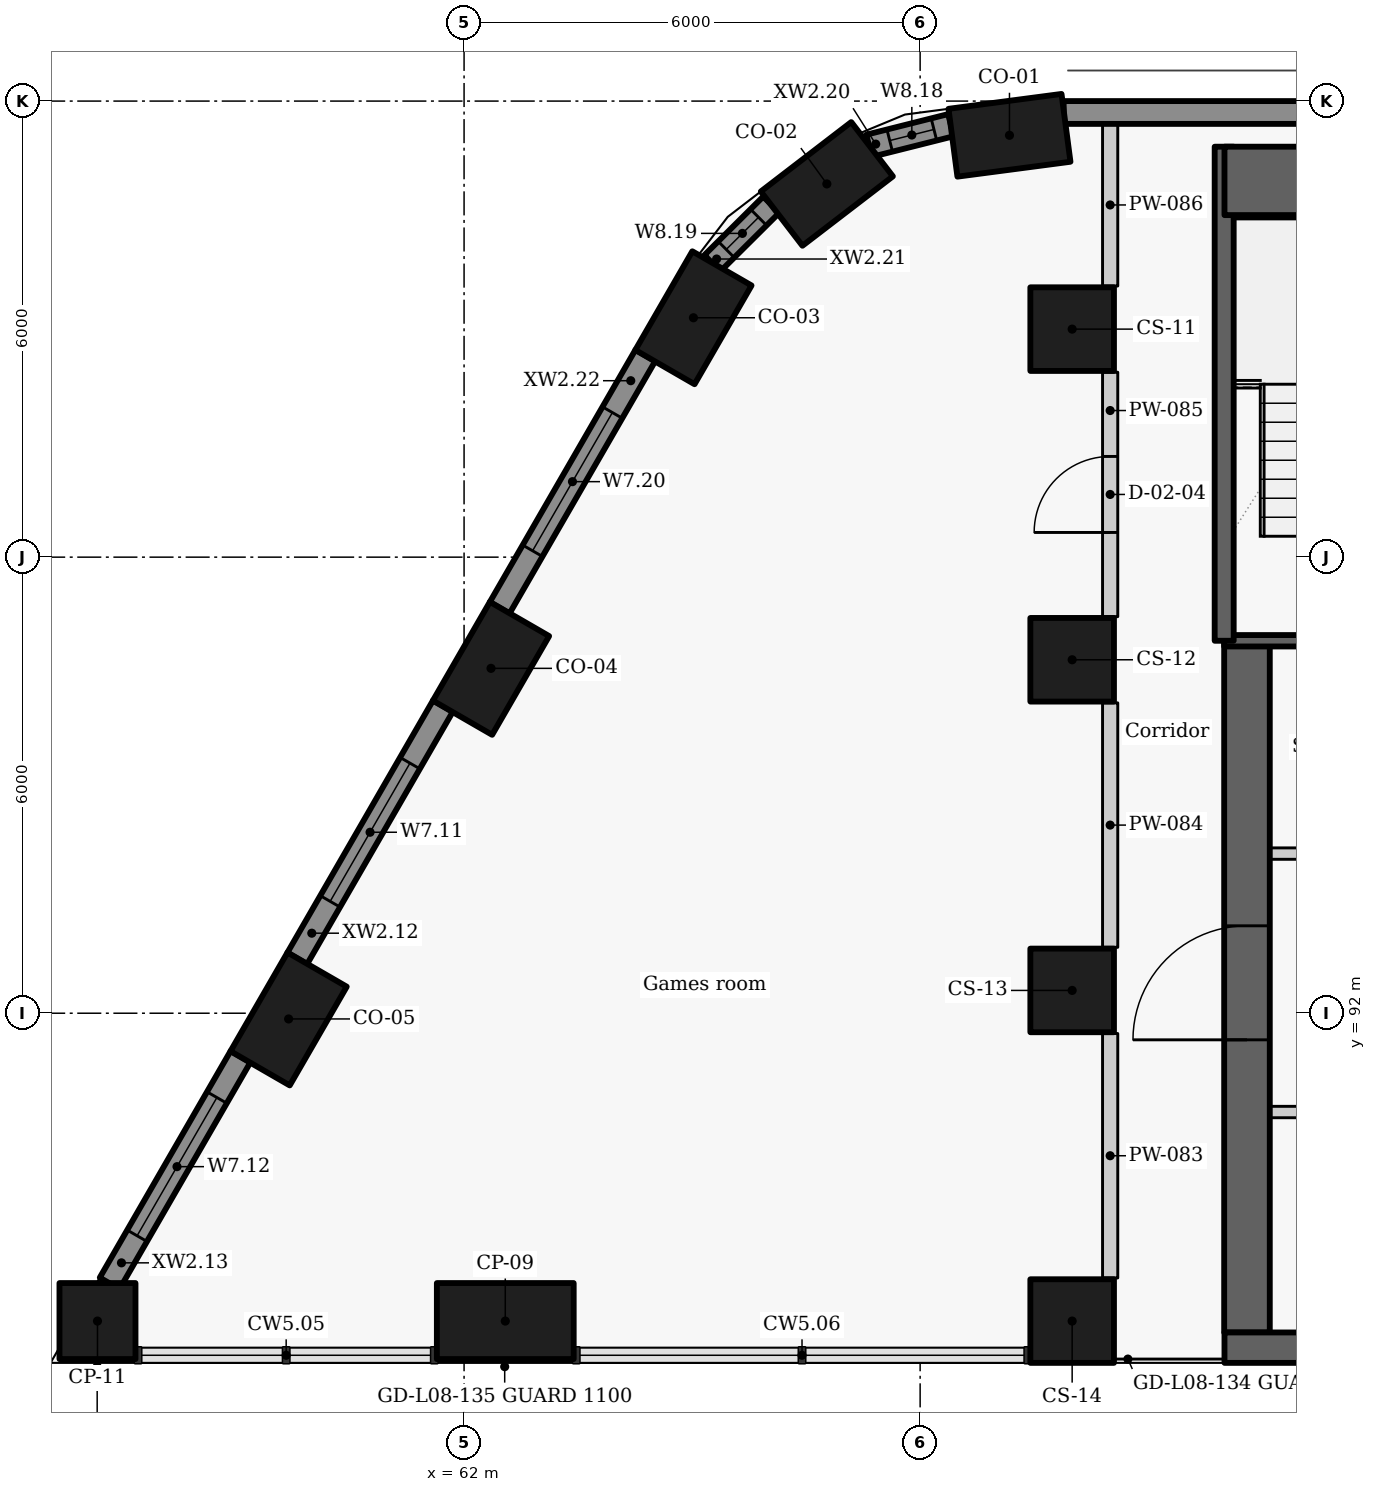
"""IFC4 building model, lengths in metres.
Left out: names, types, materials, properties, quantities, classifications, styles, units other than length and angle.
Written with IfcOpenShell. Run it as: python <this file> out.ifc"""

import sys

from ifc_helpers import new_model, si_unit, direction, frame, frame_2d, origin, origin_2d, place, context, subcontext, project, spatial, rectangle, extrude, element, fill, save


model = new_model("IFC4")
c1 = context("Model", 3, precision=1e-05, world=origin(), true_north=direction((0.0, 1.0)))
c2 = subcontext(c1, "Body", "Model", "MODEL_VIEW")
j1 = project(units=[si_unit("LENGTHUNIT", "METRE"), si_unit("PLANEANGLEUNIT", "RADIAN")], contexts=[c1])
p1 = place(None, origin())
s1 = spatial("IfcSite", under=j1, at=p1, CompositionType="ELEMENT")
p2 = place(p1, origin())
s2 = spatial("IfcBuilding", under=s1, at=p2, CompositionType="ELEMENT")
p3 = place(p2, frame((0.0, 0.0, 34.8)))
s3 = spatial("IfcBuildingStorey", under=s2, at=p3, CompositionType="ELEMENT", Elevation=34.8)
for number, where, z_axis, x_axis in (
    (1, (69.175, 103.55, 0.0), (0.0, 0.0, 1.0), (-0.991, -0.131, 0.0)),
    (2, (66.773, 102.91, 0.0), (0.0, 0.0, 1.0), (-0.793, -0.609, 0.0)),
    (3, (65.018, 101.149, 0.0), (0.0, 0.0, 1.0), (-0.5, -0.866, 0.0)),
    (4, (62.354, 96.537, 0.0), (0.0, 0.0, 1.0), (-0.5, -0.866, 0.0)),
    (5, (59.692, 91.925, 0.0), (0.0, 0.0, 1.0), (-0.5, -0.866, 0.0)),
):
    element("IfcColumn", number, at=place(p3, frame(where, z_axis=z_axis, x_axis=x_axis)), inside=s3, PredefinedType="COLUMN", context=c2, shape_type="SweptSolid", body=[
        extrude(rectangle(XDim=1.5, YDim=0.9, at=origin_2d()), origin(), (0.0, 0.0, 1.0), 3.3),
    ])
for number, where, z_axis, x_axis in (
    (6, (70.0, 101.0, 0.0), (0.0, 0.0, 1.0), (0.0, -1.0, 0.0)),
    (7, (70.0, 96.65, 0.0), (0.0, 0.0, 1.0), (0.0, -1.0, 0.0)),
    (8, (70.0, 92.3, 0.0), (0.0, 0.0, 1.0), (0.0, -1.0, 0.0)),
    (9, (70.0, 87.95, 0.0), (0.0, 0.0, 1.0), (0.0, -1.0, 0.0)),
):
    element("IfcColumn", number, at=place(p3, frame(where, z_axis=z_axis, x_axis=x_axis)), inside=s3, PredefinedType="COLUMN", context=c2, shape_type="SweptSolid", body=[
        extrude(rectangle(XDim=1.1, YDim=1.1, at=origin_2d()), origin(), (0.0, 0.0, 1.0), 3.3),
    ])
p4 = place(p3, frame((62.542, 87.95, 0.0), z_axis=(0.0, 0.0, 1.0), x_axis=(1.0, 0.0, 0.0)))
e10 = element("IfcColumn", 10, at=p4, inside=s3, PredefinedType="COLUMN", context=c2, shape_type="SweptSolid", body=[
    extrude(rectangle(XDim=1.8, YDim=1.0, at=origin_2d()), origin(), (0.0, 0.0, 1.0), 3.3),
])
p5 = place(p3, frame((57.177, 87.95, 0.0), z_axis=(0.0, 0.0, 1.0), x_axis=(1.0, 0.0, 0.0)))
e11 = element("IfcColumn", 11, at=p5, inside=s3, PredefinedType="COLUMN", context=c2, shape_type="SweptSolid", body=[
    extrude(rectangle(XDim=1.0, YDim=1.0, at=origin_2d()), origin(), (0.0, 0.0, 1.0), 3.3),
])
p6 = place(p3, frame((61.722, 96.041, 0.0), z_axis=(0.0, 0.0, 1.0), x_axis=(-0.500001735503, -0.866024401789, 0.0)))
e12 = element("IfcWall", 12, at=p6, inside=s3, PredefinedType="SOLIDWALL", context=c2, shape_type="SweptSolid", body=[
    extrude(rectangle(XDim=3.834, YDim=0.3, at=frame_2d((1.917, 0.0))), origin(), (0.0, 0.0, 1.0), 2.3),
])
p7 = place(p6, frame((0.867, 0.0, 0.9)))
e13 = element("IfcOpeningElement", 13, at=p7, cuts=e12, PredefinedType="OPENING", context=c2, shape_type="SweptSolid", body=[
    extrude(rectangle(XDim=2.1, YDim=1.1, at=frame_2d((1.05, 0.55))), frame((0.0, 0.16, 0.0), z_axis=(0.0, -1.0, 0.0), x_axis=(1.0, 0.0, 0.0)), (0.0, 0.0, 1.0), 0.32),
])
p8 = place(p3, frame((59.059, 91.429, 0.0), z_axis=(0.0, 0.0, 1.0), x_axis=(-0.500035437112, -0.866004943191, 0.0)))
e14 = element("IfcWall", 14, at=p8, inside=s3, PredefinedType="SOLIDWALL", context=c2, shape_type="SweptSolid", body=[
    extrude(rectangle(XDim=3.444, YDim=0.3, at=frame_2d((1.722, 0.0))), origin(), (0.0, 0.0, 1.0), 2.3),
])
p9 = place(p8, frame((0.621, 0.0, 0.9)))
e15 = element("IfcOpeningElement", 15, at=p9, cuts=e14, PredefinedType="OPENING", context=c2, shape_type="SweptSolid", body=[
    extrude(rectangle(XDim=2.1, YDim=1.1, at=frame_2d((1.05, 0.55))), frame((0.0, 0.16, 0.0), z_axis=(0.0, -1.0, 0.0), x_axis=(1.0, 0.0, 0.0)), (0.0, 0.0, 1.0), 0.32),
])
p10 = place(p3, frame((90.079, 103.85, 0.0), z_axis=(0.0, 0.0, 1.0), x_axis=(-1.0, 0.0, 0.0)))
e16 = element("IfcWall", 16, at=p10, inside=s3, PredefinedType="SOLIDWALL", context=c2, shape_type="SweptSolid", body=[
    extrude(rectangle(XDim=20.19, YDim=0.3, at=frame_2d((10.095, 0.0))), origin(), (0.0, 0.0, 1.0), 2.3),
])
p11 = place(p3, frame((68.405, 103.683, 0.0), z_axis=(0.0, 0.0, 1.0), x_axis=(-0.969766298956, -0.244035500304, 0.0)))
e17 = element("IfcWall", 17, at=p11, inside=s3, PredefinedType="SOLIDWALL", context=c2, shape_type="SweptSolid", body=[
    extrude(rectangle(XDim=1.111, YDim=0.3, at=frame_2d((0.555, 0.0))), origin(), (0.0, 0.0, 1.0), 2.3),
])
p12 = place(p11, frame((0.231, 0.0, 0.9)))
e18 = element("IfcOpeningElement", 18, at=p12, cuts=e17, PredefinedType="OPENING", context=c2, shape_type="SweptSolid", body=[
    extrude(rectangle(XDim=0.6, YDim=1.1, at=frame_2d((0.3, 0.55))), frame((0.0, 0.16, 0.0), z_axis=(0.0, -1.0, 0.0), x_axis=(1.0, 0.0, 0.0)), (0.0, 0.0, 1.0), 0.32),
])
p13 = place(p3, frame((66.042, 102.637, 0.0), z_axis=(0.0, 0.0, 1.0), x_axis=(-0.708892395813, -0.705316646024, 0.0)))
e19 = element("IfcWall", 19, at=p13, inside=s3, PredefinedType="SOLIDWALL", context=c2, shape_type="SweptSolid", body=[
    extrude(rectangle(XDim=1.093, YDim=0.3, at=frame_2d((0.546, 0.0))), origin(), (0.0, 0.0, 1.0), 2.3),
])
p14 = place(p13, frame((0.236, 0.0, 0.9)))
e20 = element("IfcOpeningElement", 20, at=p14, cuts=e19, PredefinedType="OPENING", context=c2, shape_type="SweptSolid", body=[
    extrude(rectangle(XDim=0.6, YDim=1.1, at=frame_2d((0.3, 0.55))), frame((0.0, 0.16, 0.0), z_axis=(0.0, -1.0, 0.0), x_axis=(1.0, 0.0, 0.0)), (0.0, 0.0, 1.0), 0.32),
])
p15 = place(p3, frame((64.385, 100.654, 0.0), z_axis=(0.0, 0.0, 1.0), x_axis=(-0.499974163209, -0.866040320149, 0.0)))
e21 = element("IfcWall", 21, at=p15, inside=s3, PredefinedType="SOLIDWALL", context=c2, shape_type="SweptSolid", body=[
    extrude(rectangle(XDim=3.834, YDim=0.3, at=frame_2d((1.917, 0.0))), origin(), (0.0, 0.0, 1.0), 2.3),
])
p16 = place(p15, frame((0.867, 0.0, 0.9)))
e22 = element("IfcOpeningElement", 22, at=p16, cuts=e21, PredefinedType="OPENING", context=c2, shape_type="SweptSolid", body=[
    extrude(rectangle(XDim=2.1, YDim=1.1, at=frame_2d((1.05, 0.55))), frame((0.0, 0.16, 0.0), z_axis=(0.0, -1.0, 0.0), x_axis=(1.0, 0.0, 0.0)), (0.0, 0.0, 1.0), 0.32),
])
p17 = place(p3, frame((74.6, 90.7, 0.0), z_axis=(0.0, 0.0, 1.0), x_axis=(-1.0, 0.0, 0.0)))
e23 = element("IfcWall", 23, at=p17, inside=s3, PredefinedType="PARTITIONING", context=c2, shape_type="SweptSolid", body=[
    extrude(rectangle(XDim=2.6, YDim=0.15, at=frame_2d((1.3, 0.0))), origin(), (0.0, 0.0, 1.0), 2.9),
])
p18 = place(p17, frame((0.525, 0.0, 0.0)))
e24 = element("IfcOpeningElement", 24, at=p18, cuts=e23, PredefinedType="OPENING", context=c2, shape_type="SweptSolid", body=[
    extrude(rectangle(XDim=0.9, YDim=2.1, at=frame_2d((0.45, 1.05))), frame((0.0, 0.085, 0.0), z_axis=(0.0, -1.0, 0.0), x_axis=(1.0, 0.0, 0.0)), (0.0, 0.0, 1.0), 0.17),
])
p19 = place(p3, frame((72.3, 87.8, -0.275), z_axis=(0.0, 0.0, 1.0), x_axis=(0.0, 1.0, 0.0)))
e25 = element("IfcWall", 25, at=p19, inside=s3, PredefinedType="SHEAR", context=c2, shape_type="SweptSolid", body=[
    extrude(rectangle(XDim=9.1, YDim=0.6, at=frame_2d((4.55, 0.0))), origin(), (0.0, 0.0, 1.0), 3.175),
])
p20 = place(p19, frame((3.85, 0.0, 0.275)))
e26 = element("IfcOpeningElement", 26, at=p20, cuts=e25, PredefinedType="OPENING", context=c2, shape_type="SweptSolid", body=[
    extrude(rectangle(XDim=1.5, YDim=2.1, at=frame_2d((0.75, 1.05))), frame((0.0, 0.31, 0.0), z_axis=(0.0, -1.0, 0.0), x_axis=(1.0, 0.0, 0.0)), (0.0, 0.0, 1.0), 0.62),
])
p21 = place(p3, frame((72.0, 94.1, 0.0), z_axis=(0.0, 0.0, 1.0), x_axis=(1.0, 0.0, 0.0)))
e27 = element("IfcWall", 27, at=p21, inside=s3, PredefinedType="PARTITIONING", context=c2, shape_type="SweptSolid", body=[
    extrude(rectangle(XDim=2.603, YDim=0.15, at=frame_2d((1.302, 0.0))), origin(), (0.0, 0.0, 1.0), 2.9),
])
p22 = place(p21, frame((1.075, 0.0, 0.0)))
e28 = element("IfcOpeningElement", 28, at=p22, cuts=e27, PredefinedType="OPENING", context=c2, shape_type="SweptSolid", body=[
    extrude(rectangle(XDim=1.1, YDim=2.1, at=frame_2d((0.55, 1.05))), frame((0.0, 0.085, 0.0), z_axis=(0.0, -1.0, 0.0), x_axis=(1.0, 0.0, 0.0)), (0.0, 0.0, 1.0), 0.17),
])
p23 = place(p3, frame((74.6, 96.9, -0.275), z_axis=(0.0, 0.0, 1.0), x_axis=(-1.0, 0.0, 0.0)))
e29 = element("IfcWall", 29, at=p23, inside=s3, PredefinedType="SHEAR", context=c2, shape_type="SweptSolid", body=[
    extrude(rectangle(XDim=2.6, YDim=0.15, at=frame_2d((1.3, 0.0))), origin(), (0.0, 0.0, 1.0), 3.175),
])
p24 = place(p23, frame((0.37, 0.0, 0.275)))
e30 = element("IfcOpeningElement", 30, at=p24, cuts=e29, PredefinedType="OPENING", context=c2, shape_type="SweptSolid", body=[
    extrude(rectangle(XDim=1.1, YDim=2.1, at=frame_2d((0.55, 1.05))), frame((0.0, 0.085, 0.0), z_axis=(0.0, -1.0, 0.0), x_axis=(1.0, 0.0, 0.0)), (0.0, 0.0, 1.0), 0.17),
])
p25 = place(p3, frame((72.0, 96.9, -0.275), z_axis=(0.0, 0.0, 1.0), x_axis=(0.0, 1.0, 0.0)))
e31 = element("IfcWall", 31, at=p25, inside=s3, PredefinedType="SHEAR", context=c2, shape_type="SweptSolid", body=[
    extrude(rectangle(XDim=6.5, YDim=0.25, at=frame_2d((3.25, 0.0))), origin(), (0.0, 0.0, 1.0), 3.175),
])
p26 = place(p3, frame((70.5, 88.517, 0.0), z_axis=(0.0, 0.0, 1.0), x_axis=(0.0, 1.0, 0.0)))
e32 = element("IfcWall", 32, at=p26, inside=s3, PredefinedType="PARTITIONING", context=c2, shape_type="SweptSolid", body=[
    extrude(rectangle(XDim=3.216, YDim=0.2, at=frame_2d((1.608, 0.0))), origin(), (0.0, 0.0, 1.0), 2.9),
])
p27 = place(p3, frame((70.5, 92.867, 0.0), z_axis=(0.0, 0.0, 1.0), x_axis=(0.0, 1.0, 0.0)))
e33 = element("IfcWall", 33, at=p27, inside=s3, PredefinedType="PARTITIONING", context=c2, shape_type="SweptSolid", body=[
    extrude(rectangle(XDim=3.216, YDim=0.2, at=frame_2d((1.608, 0.0))), origin(), (0.0, 0.0, 1.0), 2.9),
])
p28 = place(p3, frame((70.5, 97.217, 0.0), z_axis=(0.0, 0.0, 1.0), x_axis=(0.0, 1.0, 0.0)))
e34 = element("IfcWall", 34, at=p28, inside=s3, PredefinedType="PARTITIONING", context=c2, shape_type="SweptSolid", body=[
    extrude(rectangle(XDim=3.216, YDim=0.2, at=frame_2d((1.608, 0.0))), origin(), (0.0, 0.0, 1.0), 2.9),
])
p29 = place(p28, frame((1.108, 0.0, 0.0)))
e35 = element("IfcOpeningElement", 35, at=p29, cuts=e34, PredefinedType="OPENING", context=c2, shape_type="SweptSolid", body=[
    extrude(rectangle(XDim=1.0, YDim=2.1, at=frame_2d((0.5, 1.05))), frame((0.0, 0.11, 0.0), z_axis=(0.0, -1.0, 0.0), x_axis=(1.0, 0.0, 0.0)), (0.0, 0.0, 1.0), 0.22),
])
p30 = place(p3, frame((70.5, 101.567, 0.0), z_axis=(0.0, 0.0, 1.0), x_axis=(0.0, 1.0, 0.0)))
e36 = element("IfcWall", 36, at=p30, inside=s3, PredefinedType="PARTITIONING", context=c2, shape_type="SweptSolid", body=[
    extrude(rectangle(XDim=2.133, YDim=0.2, at=frame_2d((1.066, 0.0))), origin(), (0.0, 0.0, 1.0), 2.9),
])
p31 = place(p3, frame((72.004, 87.6, -0.275), z_axis=(0.0, 0.0, 1.0), x_axis=(1.0, 0.0, 0.0)))
e37 = element("IfcWall", 37, at=p31, inside=s3, PredefinedType="SHEAR", context=c2, shape_type="SweptSolid", body=[
    extrude(rectangle(XDim=15.992, YDim=0.4, at=frame_2d((7.996, 0.0))), origin(), (0.0, 0.0, 1.0), 3.175),
])
p32 = place(p3, frame((72.004, 102.95, -0.275), z_axis=(0.0, 0.0, 1.0), x_axis=(1.0, 0.0, 0.0)))
e38 = element("IfcWall", 38, at=p32, inside=s3, PredefinedType="SHEAR", context=c2, shape_type="SweptSolid", body=[
    extrude(rectangle(XDim=15.992, YDim=0.9, at=frame_2d((7.996, 0.0))), origin(), (0.0, 0.0, 1.0), 3.175),
])
p33 = place(p7, origin())
e39 = element("IfcWindow", 39, at=p33, inside=s3, PartitioningType="SINGLE_PANEL", PredefinedType="WINDOW", context=c2, shape_type="SweptSolid", body=[
    extrude(rectangle(XDim=2.1, YDim=1.1, at=frame_2d((1.05, 0.55))), frame((0.0, 0.03, 0.0), z_axis=(0.0, -1.0, 0.0), x_axis=(1.0, 0.0, 0.0)), (0.0, 0.0, 1.0), 0.06),
])
fill(e13, e39)
p34 = place(p9, origin())
e40 = element("IfcWindow", 40, at=p34, inside=s3, PartitioningType="SINGLE_PANEL", PredefinedType="WINDOW", context=c2, shape_type="SweptSolid", body=[
    extrude(rectangle(XDim=2.1, YDim=1.1, at=frame_2d((1.05, 0.55))), frame((0.0, 0.03, 0.0), z_axis=(0.0, -1.0, 0.0), x_axis=(1.0, 0.0, 0.0)), (0.0, 0.0, 1.0), 0.06),
])
fill(e15, e40)
p35 = place(p12, origin())
e41 = element("IfcWindow", 41, at=p35, inside=s3, PartitioningType="SINGLE_PANEL", PredefinedType="WINDOW", context=c2, shape_type="SweptSolid", body=[
    extrude(rectangle(XDim=0.6, YDim=1.1, at=frame_2d((0.3, 0.55))), frame((0.0, 0.03, 0.0), z_axis=(0.0, -1.0, 0.0), x_axis=(1.0, 0.0, 0.0)), (0.0, 0.0, 1.0), 0.06),
])
fill(e18, e41)
p36 = place(p14, origin())
e42 = element("IfcWindow", 42, at=p36, inside=s3, PartitioningType="SINGLE_PANEL", PredefinedType="WINDOW", context=c2, shape_type="SweptSolid", body=[
    extrude(rectangle(XDim=0.6, YDim=1.1, at=frame_2d((0.3, 0.55))), frame((0.0, 0.03, 0.0), z_axis=(0.0, -1.0, 0.0), x_axis=(1.0, 0.0, 0.0)), (0.0, 0.0, 1.0), 0.06),
])
fill(e20, e42)
p37 = place(p16, origin())
e43 = element("IfcWindow", 43, at=p37, inside=s3, PartitioningType="SINGLE_PANEL", PredefinedType="WINDOW", context=c2, shape_type="SweptSolid", body=[
    extrude(rectangle(XDim=2.1, YDim=1.1, at=frame_2d((1.05, 0.55))), frame((0.0, 0.03, 0.0), z_axis=(0.0, -1.0, 0.0), x_axis=(1.0, 0.0, 0.0)), (0.0, 0.0, 1.0), 0.06),
])
fill(e22, e43)
p38 = place(p29, origin())
e44 = element("IfcDoor", 44, at=p38, inside=s3, OperationType="SINGLE_SWING_LEFT", PredefinedType="DOOR", context=c2, shape_type="SweptSolid", body=[
    extrude(rectangle(XDim=1.0, YDim=2.1, at=frame_2d((0.5, 1.05))), frame((0.0, 0.025, 0.0), z_axis=(0.0, -1.0, 0.0), x_axis=(1.0, 0.0, 0.0)), (0.0, 0.0, 1.0), 0.05),
])
fill(e35, e44)
p39 = place(p20, origin())
e45 = element("IfcDoor", 45, at=p39, inside=s3, OperationType="DOUBLE_DOOR_SINGLE_SWING", PredefinedType="DOOR", context=c2, shape_type="SweptSolid", body=[
    extrude(rectangle(XDim=1.5, YDim=2.1, at=frame_2d((0.75, 1.05))), frame((0.0, 0.025, 0.0), z_axis=(0.0, -1.0, 0.0), x_axis=(1.0, 0.0, 0.0)), (0.0, 0.0, 1.0), 0.05),
])
fill(e26, e45)
save(model, sys.argv[1])
